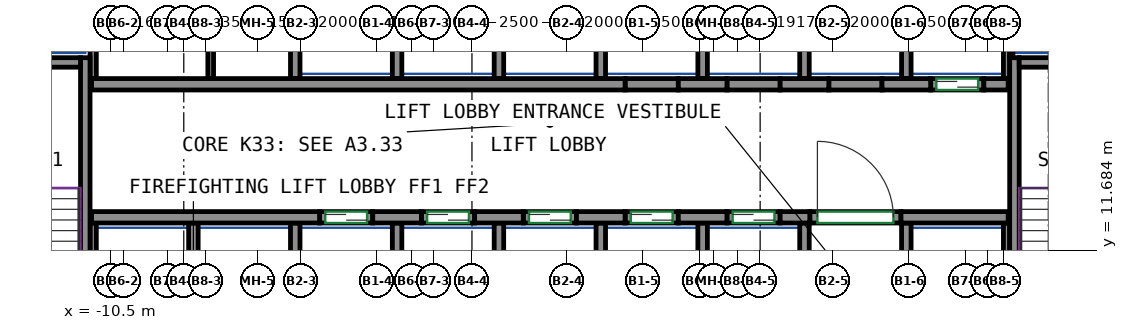
"""IFC4 building model, lengths in metres.
Left out: names, types, materials, properties, quantities, classifications, styles, units other than length and angle.
Written with IfcOpenShell. Run it as: python <this file> out.ifc"""

import sys

from ifc_helpers import new_model, si_unit, direction, frame, frame_2d, origin, place, context, subcontext, project, spatial, rectangle, extrude, source, transform, mapped, element, fill, save


model = new_model("IFC4")
c1 = context("Model", 3, precision=1e-05, world=origin(), true_north=direction((0.0, 1.0)))
c2 = subcontext(c1, "Body", "Model", "MODEL_VIEW")
j1 = project(units=[si_unit("LENGTHUNIT", "METRE"), si_unit("PLANEANGLEUNIT", "RADIAN")], contexts=[c1])
p1 = place(None, origin())
s1 = spatial("IfcSite", under=j1, at=p1, CompositionType="ELEMENT")
p2 = place(p1, origin())
s2 = spatial("IfcBuilding", under=s1, at=p2, CompositionType="ELEMENT")
p3 = place(p2, frame((0.0, 0.0, 143.9)))
s3 = spatial("IfcBuildingStorey", under=s2, at=p3, CompositionType="ELEMENT", Elevation=143.9)
m1 = source(origin(), c2, "Body", "SweptSolid", [
    extrude(rectangle(XDim=7.75, YDim=0.25, at=frame_2d((3.875, 0.0))), origin(), (0.0, 0.0, 1.0), 3.12),
])
p4 = place(p3, frame((-11.175, 9.0, 0.0), z_axis=(0.0, 0.0, 1.0), x_axis=(0.0, 1.0, 0.0)))
e1 = element("IfcWall", 1, at=p4, inside=s3, PredefinedType="SHEAR", context=c2, shape_type="MappedRepresentation", body=[
    mapped(m1, transform((0.0, 0.0, 0.0))),
])
m2 = source(origin(), c2, "Body", "SweptSolid", [
    extrude(rectangle(XDim=3.7, YDim=0.25, at=frame_2d((1.85, 0.0))), origin(), (0.0, 0.0, 1.0), 3.12),
])
p5 = place(p3, frame((-15.0, 16.625, 0.0), z_axis=(0.0, 0.0, 1.0), x_axis=(1.0, 0.0, 0.0)))
e2 = element("IfcWall", 2, at=p5, inside=s3, PredefinedType="SHEAR", context=c2, shape_type="MappedRepresentation", body=[
    mapped(m2, transform((0.0, 0.0, 0.0))),
])
p6 = place(p3, frame((13.275, 9.0, 0.0), z_axis=(0.0, 0.0, 1.0), x_axis=(0.0, 1.0, 0.0)))
e3 = element("IfcWall", 3, at=p6, inside=s3, PredefinedType="SHEAR", context=c2, shape_type="MappedRepresentation", body=[
    mapped(m1, transform((0.0, 0.0, 0.0))),
])
m3 = source(origin(), c2, "Body", "SweptSolid", [
    extrude(rectangle(XDim=3.7, YDim=0.25, at=frame_2d((1.85, 0.0))), origin(), (0.0, 0.0, 1.0), 3.12),
])
p7 = place(p3, frame((13.4, 16.625, 0.0), z_axis=(0.0, 0.0, 1.0), x_axis=(1.0, 0.0, 0.0)))
e4 = element("IfcWall", 4, at=p7, inside=s3, PredefinedType="SHEAR", context=c2, shape_type="MappedRepresentation", body=[
    mapped(m3, transform((0.0, 0.0, 0.0))),
])
m4 = source(origin(), c2, "Body", "SweptSolid", [
    extrude(rectangle(XDim=6.0, YDim=0.3, at=frame_2d((3.0, 0.0))), origin(), (0.0, 0.0, 1.0), 3.12),
])
p8 = place(p3, frame((-11.01, 12.55, 0.0), z_axis=(0.0, 0.0, 1.0), x_axis=(1.0, 0.0, 0.0)))
e5 = element("IfcWall", 5, at=p8, inside=s3, PredefinedType="SHEAR", context=c2, shape_type="MappedRepresentation", body=[
    mapped(m4, transform((0.0, 0.0, 0.0))),
])
m5 = source(origin(), c2, "Body", "SweptSolid", [
    extrude(rectangle(XDim=1.28, YDim=0.3, at=frame_2d((0.64, 0.0))), origin(), (0.0, 0.0, 1.0), 3.12),
])
for number, where, z_axis, x_axis in (
    (6, (-3.61, 12.55, 0.0), (0.0, 0.0, 1.0), (1.0, 0.0, 0.0)),
    (7, (-0.93, 12.55, 0.0), (0.0, 0.0, 1.0), (1.0, 0.0, 0.0)),
    (8, (1.75, 12.55, 0.0), (0.0, 0.0, 1.0), (1.0, 0.0, 0.0)),
    (9, (4.43, 12.55, 0.0), (0.0, 0.0, 1.0), (1.0, 0.0, 0.0)),
):
    element("IfcWall", number, at=place(p3, frame(where, z_axis=z_axis, x_axis=x_axis)), inside=s3, PredefinedType="SHEAR", context=c2, shape_type="MappedRepresentation", body=[
        mapped(m5, transform((0.0, 0.0, 0.0))),
    ])
m6 = source(origin(), c2, "Body", "SweptSolid", [
    extrude(rectangle(XDim=0.78, YDim=0.3, at=frame_2d((0.39, 0.0))), origin(), (0.0, 0.0, 1.0), 3.12),
])
p9 = place(p3, frame((7.11, 12.55, 0.0), z_axis=(0.0, 0.0, 1.0), x_axis=(1.0, 0.0, 0.0)))
e10 = element("IfcWall", 10, at=p9, inside=s3, PredefinedType="SHEAR", context=c2, shape_type="MappedRepresentation", body=[
    mapped(m6, transform((0.0, 0.0, 0.0))),
])
m7 = source(origin(), c2, "Body", "SweptSolid", [
    extrude(rectangle(XDim=2.82, YDim=0.3, at=frame_2d((1.41, 0.0))), origin(), (0.0, 0.0, 1.0), 3.12),
])
p10 = place(p3, frame((10.29, 12.55, 0.0), z_axis=(0.0, 0.0, 1.0), x_axis=(1.0, 0.0, 0.0)))
e11 = element("IfcWall", 11, at=p10, inside=s3, PredefinedType="SHEAR", context=c2, shape_type="MappedRepresentation", body=[
    mapped(m7, transform((0.0, 0.0, 0.0))),
])
m8 = source(origin(), c2, "Body", "SweptSolid", [
    extrude(rectangle(XDim=14.04, YDim=0.3, at=frame_2d((7.02, 0.0))), origin(), (0.0, 0.0, 1.0), 3.12),
])
p11 = place(p3, frame((-11.01, 16.05, 0.0), z_axis=(0.0, 0.0, 1.0), x_axis=(1.0, 0.0, 0.0)))
e12 = element("IfcWall", 12, at=p11, inside=s3, PredefinedType="SHEAR", context=c2, shape_type="MappedRepresentation", body=[
    mapped(m8, transform((0.0, 0.0, 0.0))),
])
p12 = place(p3, frame((4.43, 16.05, 0.0), z_axis=(0.0, 0.0, 1.0), x_axis=(1.0, 0.0, 0.0)))
e13 = element("IfcWall", 13, at=p12, inside=s3, PredefinedType="SHEAR", context=c2, shape_type="MappedRepresentation", body=[
    mapped(m5, transform((0.0, 0.0, 0.0))),
])
m9 = source(origin(), c2, "Body", "SweptSolid", [
    extrude(rectangle(XDim=1.28, YDim=0.3, at=frame_2d((0.64, 0.0))), origin(), (0.0, 0.0, 1.0), 3.12),
])
p13 = place(p3, frame((7.11, 16.05, 0.0), z_axis=(0.0, 0.0, 1.0), x_axis=(1.0, 0.0, 0.0)))
e14 = element("IfcWall", 14, at=p13, inside=s3, PredefinedType="SHEAR", context=c2, shape_type="MappedRepresentation", body=[
    mapped(m9, transform((0.0, 0.0, 0.0))),
])
p14 = place(p3, frame((9.79, 16.05, 0.0), z_axis=(0.0, 0.0, 1.0), x_axis=(1.0, 0.0, 0.0)))
e15 = element("IfcWall", 15, at=p14, inside=s3, PredefinedType="SHEAR", context=c2, shape_type="MappedRepresentation", body=[
    mapped(m5, transform((0.0, 0.0, 0.0))),
])
m10 = source(origin(), c2, "Body", "SweptSolid", [
    extrude(rectangle(XDim=0.64, YDim=0.3, at=frame_2d((0.32, 0.0))), origin(), (0.0, 0.0, 1.0), 3.12),
])
p15 = place(p3, frame((12.47, 16.05, 0.0), z_axis=(0.0, 0.0, 1.0), x_axis=(1.0, 0.0, 0.0)))
e16 = element("IfcWall", 16, at=p15, inside=s3, PredefinedType="SHEAR", context=c2, shape_type="MappedRepresentation", body=[
    mapped(m10, transform((0.0, 0.0, 0.0))),
])
m11 = source(origin(), c2, "Body", "SweptSolid", [
    extrude(rectangle(XDim=1.4, YDim=0.3, at=frame_2d((0.7, 0.0))), origin(), (0.0, 0.0, 1.0), 3.12),
])
p16 = place(p3, frame((-5.01, 12.55, 0.0), z_axis=(0.0, 0.0, 1.0), x_axis=(1.0, 0.0, 0.0)))
e17 = element("IfcWall", 17, at=p16, inside=s3, PredefinedType="PARTITIONING", context=c2, shape_type="MappedRepresentation", body=[
    mapped(m11, transform((0.0, 0.0, 0.0))),
])
p17 = place(p16, frame((0.15, 0.0, 0.0)))
e18 = element("IfcOpeningElement", 18, at=p17, cuts=e17, PredefinedType="OPENING", context=c2, shape_type="SweptSolid", body=[
    extrude(rectangle(XDim=1.1, YDim=2.1, at=frame_2d((0.55, 1.05))), frame((0.0, 0.16, 0.0), z_axis=(0.0, -1.0, 0.0), x_axis=(1.0, 0.0, 0.0)), (0.0, 0.0, 1.0), 0.32),
])
m12 = source(origin(), c2, "Body", "SweptSolid", [
    extrude(rectangle(XDim=1.4, YDim=0.3, at=frame_2d((0.7, 0.0))), origin(), (0.0, 0.0, 1.0), 3.12),
])
p18 = place(p3, frame((-2.33, 12.55, 0.0), z_axis=(0.0, 0.0, 1.0), x_axis=(1.0, 0.0, 0.0)))
e19 = element("IfcWall", 19, at=p18, inside=s3, PredefinedType="PARTITIONING", context=c2, shape_type="MappedRepresentation", body=[
    mapped(m12, transform((0.0, 0.0, 0.0))),
])
p19 = place(p18, frame((0.15, 0.0, 0.0)))
e20 = element("IfcOpeningElement", 20, at=p19, cuts=e19, PredefinedType="OPENING", context=c2, shape_type="SweptSolid", body=[
    extrude(rectangle(XDim=1.1, YDim=2.1, at=frame_2d((0.55, 1.05))), frame((0.0, 0.16, 0.0), z_axis=(0.0, -1.0, 0.0), x_axis=(1.0, 0.0, 0.0)), (0.0, 0.0, 1.0), 0.32),
])
p20 = place(p3, frame((0.35, 12.55, 0.0), z_axis=(0.0, 0.0, 1.0), x_axis=(1.0, 0.0, 0.0)))
e21 = element("IfcWall", 21, at=p20, inside=s3, PredefinedType="PARTITIONING", context=c2, shape_type="MappedRepresentation", body=[
    mapped(m11, transform((0.0, 0.0, 0.0))),
])
p21 = place(p20, frame((0.15, 0.0, 0.0)))
e22 = element("IfcOpeningElement", 22, at=p21, cuts=e21, PredefinedType="OPENING", context=c2, shape_type="SweptSolid", body=[
    extrude(rectangle(XDim=1.1, YDim=2.1, at=frame_2d((0.55, 1.05))), frame((0.0, 0.16, 0.0), z_axis=(0.0, -1.0, 0.0), x_axis=(1.0, 0.0, 0.0)), (0.0, 0.0, 1.0), 0.32),
])
p22 = place(p3, frame((3.03, 12.55, 0.0), z_axis=(0.0, 0.0, 1.0), x_axis=(1.0, 0.0, 0.0)))
e23 = element("IfcWall", 23, at=p22, inside=s3, PredefinedType="PARTITIONING", context=c2, shape_type="MappedRepresentation", body=[
    mapped(m11, transform((0.0, 0.0, 0.0))),
])
p23 = place(p22, frame((0.15, 0.0, 0.0)))
e24 = element("IfcOpeningElement", 24, at=p23, cuts=e23, PredefinedType="OPENING", context=c2, shape_type="SweptSolid", body=[
    extrude(rectangle(XDim=1.1, YDim=2.1, at=frame_2d((0.55, 1.05))), frame((0.0, 0.16, 0.0), z_axis=(0.0, -1.0, 0.0), x_axis=(1.0, 0.0, 0.0)), (0.0, 0.0, 1.0), 0.32),
])
p24 = place(p3, frame((5.71, 12.55, 0.0), z_axis=(0.0, 0.0, 1.0), x_axis=(1.0, 0.0, 0.0)))
e25 = element("IfcWall", 25, at=p24, inside=s3, PredefinedType="PARTITIONING", context=c2, shape_type="MappedRepresentation", body=[
    mapped(m12, transform((0.0, 0.0, 0.0))),
])
p25 = place(p24, frame((0.15, 0.0, 0.0)))
e26 = element("IfcOpeningElement", 26, at=p25, cuts=e25, PredefinedType="OPENING", context=c2, shape_type="SweptSolid", body=[
    extrude(rectangle(XDim=1.1, YDim=2.1, at=frame_2d((0.55, 1.05))), frame((0.0, 0.16, 0.0), z_axis=(0.0, -1.0, 0.0), x_axis=(1.0, 0.0, 0.0)), (0.0, 0.0, 1.0), 0.32),
])
p26 = place(p3, frame((11.07, 16.05, 0.0), z_axis=(0.0, 0.0, 1.0), x_axis=(1.0, 0.0, 0.0)))
e27 = element("IfcWall", 27, at=p26, inside=s3, PredefinedType="PARTITIONING", context=c2, shape_type="MappedRepresentation", body=[
    mapped(m11, transform((0.0, 0.0, 0.0))),
])
p27 = place(p26, frame((0.15, 0.0, 0.0)))
e28 = element("IfcOpeningElement", 28, at=p27, cuts=e27, PredefinedType="OPENING", context=c2, shape_type="SweptSolid", body=[
    extrude(rectangle(XDim=1.1, YDim=2.1, at=frame_2d((0.55, 1.05))), frame((0.0, 0.16, 0.0), z_axis=(0.0, -1.0, 0.0), x_axis=(1.0, 0.0, 0.0)), (0.0, 0.0, 1.0), 0.32),
])
m13 = source(origin(), c2, "Body", "SweptSolid", [
    extrude(rectangle(XDim=2.4, YDim=0.3, at=frame_2d((1.2, 0.0))), origin(), (0.0, 0.0, 1.0), 3.12),
])
p28 = place(p3, frame((7.89, 12.55, 0.0), z_axis=(0.0, 0.0, 1.0), x_axis=(1.0, 0.0, 0.0)))
e29 = element("IfcWall", 29, at=p28, inside=s3, PredefinedType="PARTITIONING", context=c2, shape_type="MappedRepresentation", body=[
    mapped(m13, transform((0.0, 0.0, 0.0))),
])
p29 = place(p28, frame((0.2, 0.0, 0.0)))
e30 = element("IfcOpeningElement", 30, at=p29, cuts=e29, PredefinedType="OPENING", context=c2, shape_type="SweptSolid", body=[
    extrude(rectangle(XDim=2.0, YDim=2.1, at=frame_2d((1.0, 1.05))), frame((0.0, 0.16, 0.0), z_axis=(0.0, -1.0, 0.0), x_axis=(1.0, 0.0, 0.0)), (0.0, 0.0, 1.0), 0.32),
])
p30 = place(p3, frame((3.03, 16.05, 0.0), z_axis=(0.0, 0.0, 1.0), x_axis=(1.0, 0.0, 0.0)))
e31 = element("IfcWall", 31, at=p30, inside=s3, PredefinedType="PARTITIONING", context=c2, shape_type="MappedRepresentation", body=[
    mapped(m11, transform((0.0, 0.0, 0.0))),
])
for number, where, z_axis, x_axis in (
    (32, (5.71, 16.05, 0.0), (0.0, 0.0, 1.0), (1.0, 0.0, 0.0)),
    (33, (8.39, 16.05, 0.0), (0.0, 0.0, 1.0), (1.0, 0.0, 0.0)),
):
    element("IfcWall", number, at=place(p3, frame(where, z_axis=z_axis, x_axis=x_axis)), inside=s3, PredefinedType="PARTITIONING", context=c2, shape_type="MappedRepresentation", body=[
        mapped(m12, transform((0.0, 0.0, 0.0))),
    ])
m14 = source(origin(), c2, "Body", "SweptSolid", [
    extrude(rectangle(XDim=3.275, YDim=0.165, at=frame_2d((1.638, 0.0))), origin(), (0.0, 0.0, 1.0), 3.12),
])
p31 = place(p3, frame((13.067, 16.2, 0.0), z_axis=(0.0, 0.0, 1.0), x_axis=(0.0, 1.0, 0.0)))
e34 = element("IfcWall", 34, at=p31, inside=s3, PredefinedType="PARTITIONING", context=c2, shape_type="MappedRepresentation", body=[
    mapped(m14, transform((0.0, 0.0, 0.0))),
])
m15 = source(origin(), c2, "Body", "SweptSolid", [
    extrude(rectangle(XDim=4.8, YDim=0.165, at=frame_2d((2.4, 0.0))), origin(), (0.0, 0.0, 1.0), 3.12),
])
p32 = place(p3, frame((-10.968, 16.2, 0.0), z_axis=(0.0, 0.0, 1.0), x_axis=(0.0, 1.0, 0.0)))
e35 = element("IfcWall", 35, at=p32, inside=s3, PredefinedType="PARTITIONING", context=c2, shape_type="MappedRepresentation", body=[
    mapped(m15, transform((0.0, 0.0, 0.0))),
])
m16 = source(origin(), c2, "Body", "SweptSolid", [
    extrude(rectangle(XDim=3.275, YDim=0.25, at=frame_2d((1.638, 0.0))), origin(), (0.0, 0.0, 1.0), 3.12),
])
p33 = place(p3, frame((10.43, 16.2, 0.0), z_axis=(0.0, 0.0, 1.0), x_axis=(0.0, 1.0, 0.0)))
e36 = element("IfcWall", 36, at=p33, inside=s3, PredefinedType="PARTITIONING", context=c2, shape_type="MappedRepresentation", body=[
    mapped(m16, transform((0.0, 0.0, 0.0))),
])
m17 = source(origin(), c2, "Body", "SweptSolid", [
    extrude(rectangle(XDim=2.725, YDim=0.085, at=frame_2d((1.363, 0.0))), origin(), (0.0, 0.0, 1.0), 3.12),
])
p34 = place(p3, frame((13.192, 16.75, 0.0), z_axis=(0.0, 0.0, 1.0), x_axis=(0.0, 1.0, 0.0)))
e37 = element("IfcWall", 37, at=p34, inside=s3, PredefinedType="PARTITIONING", context=c2, shape_type="MappedRepresentation", body=[
    mapped(m17, transform((0.0, 0.0, 0.0))),
])
for number, where, z_axis, x_axis in (
    (38, (2.39, 16.2, 0.0), (0.0, 0.0, 1.0), (0.0, 1.0, 0.0)),
    (39, (5.07, 16.2, 0.0), (0.0, 0.0, 1.0), (0.0, 1.0, 0.0)),
    (40, (7.75, 16.2, 0.0), (0.0, 0.0, 1.0), (0.0, 1.0, 0.0)),
    (41, (-0.29, 16.2, 0.0), (0.0, 0.0, 1.0), (0.0, 1.0, 0.0)),
    (42, (-2.97, 16.2, 0.0), (0.0, 0.0, 1.0), (0.0, 1.0, 0.0)),
    (43, (-5.65, 16.2, 0.0), (0.0, 0.0, 1.0), (0.0, 1.0, 0.0)),
):
    element("IfcWall", number, at=place(p3, frame(where, z_axis=z_axis, x_axis=x_axis)), inside=s3, PredefinedType="PARTITIONING", context=c2, shape_type="MappedRepresentation", body=[
        mapped(m16, transform((0.0, 0.0, 0.0))),
    ])
m18 = source(origin(), c2, "Body", "SweptSolid", [
    extrude(rectangle(XDim=3.4, YDim=0.25, at=frame_2d((1.7, 0.0))), origin(), (0.0, 0.0, 1.0), 3.12),
])
p35 = place(p3, frame((10.43, 9.0, 0.0), z_axis=(0.0, 0.0, 1.0), x_axis=(0.0, 1.0, 0.0)))
e44 = element("IfcWall", 44, at=p35, inside=s3, PredefinedType="PARTITIONING", context=c2, shape_type="MappedRepresentation", body=[
    mapped(m18, transform((0.0, 0.0, 0.0))),
])
m19 = source(origin(), c2, "Body", "SweptSolid", [
    extrude(rectangle(XDim=3.4, YDim=0.165, at=frame_2d((1.7, 0.0))), origin(), (0.0, 0.0, 1.0), 3.12),
])
p36 = place(p3, frame((13.067, 9.0, 0.0), z_axis=(0.0, 0.0, 1.0), x_axis=(0.0, 1.0, 0.0)))
e45 = element("IfcWall", 45, at=p36, inside=s3, PredefinedType="PARTITIONING", context=c2, shape_type="MappedRepresentation", body=[
    mapped(m19, transform((0.0, 0.0, 0.0))),
])
for number, where, z_axis, x_axis in (
    (46, (2.39, 9.0, 0.0), (0.0, 0.0, 1.0), (0.0, 1.0, 0.0)),
    (47, (5.07, 9.0, 0.0), (0.0, 0.0, 1.0), (0.0, 1.0, 0.0)),
    (48, (7.75, 9.0, 0.0), (0.0, 0.0, 1.0), (0.0, 1.0, 0.0)),
    (49, (-0.29, 9.0, 0.0), (0.0, 0.0, 1.0), (0.0, 1.0, 0.0)),
):
    element("IfcWall", number, at=place(p3, frame(where, z_axis=z_axis, x_axis=x_axis)), inside=s3, PredefinedType="PARTITIONING", context=c2, shape_type="MappedRepresentation", body=[
        mapped(m18, transform((0.0, 0.0, 0.0))),
    ])
p37 = place(p3, frame((-10.968, 9.0, 0.0), z_axis=(0.0, 0.0, 1.0), x_axis=(0.0, 1.0, 0.0)))
e50 = element("IfcWall", 50, at=p37, inside=s3, PredefinedType="PARTITIONING", context=c2, shape_type="MappedRepresentation", body=[
    mapped(m19, transform((0.0, 0.0, 0.0))),
])
for number, where, z_axis, x_axis in (
    (51, (-2.97, 9.0, 0.0), (0.0, 0.0, 1.0), (0.0, 1.0, 0.0)),
    (52, (-5.65, 9.0, 0.0), (0.0, 0.0, 1.0), (0.0, 1.0, 0.0)),
    (53, (-8.33, 9.0, 0.0), (0.0, 0.0, 1.0), (0.0, 1.0, 0.0)),
):
    element("IfcWall", number, at=place(p3, frame(where, z_axis=z_axis, x_axis=x_axis)), inside=s3, PredefinedType="PARTITIONING", context=c2, shape_type="MappedRepresentation", body=[
        mapped(m18, transform((0.0, 0.0, 0.0))),
    ])
m20 = source(origin(), c2, "Body", "SweptSolid", [
    extrude(rectangle(XDim=4.8, YDim=0.15, at=frame_2d((2.4, 0.0))), origin(), (0.0, 0.0, 1.0), 3.12),
])
p38 = place(p3, frame((-7.875, 16.2, 0.0), z_axis=(0.0, 0.0, 1.0), x_axis=(0.0, 1.0, 0.0)))
e54 = element("IfcWall", 54, at=p38, inside=s3, PredefinedType="PARTITIONING", context=c2, shape_type="MappedRepresentation", body=[
    mapped(m20, transform((0.0, 0.0, 0.0))),
])
p39 = place(p29, origin())
e55 = element("IfcDoor", 55, at=p39, inside=s3, OperationType="DOUBLE_DOOR_SINGLE_SWING", PredefinedType="DOOR", context=c2, shape_type="SweptSolid", body=[
    extrude(rectangle(XDim=2.0, YDim=2.1, at=frame_2d((1.0, 1.05))), frame((0.0, 0.025, 0.0), z_axis=(0.0, -1.0, 0.0), x_axis=(1.0, 0.0, 0.0)), (0.0, 0.0, 1.0), 0.05),
])
fill(e30, e55)
p40 = place(p17, origin())
e56 = element("IfcDoor", 56, at=p40, inside=s3, OperationType="DOUBLE_DOOR_SLIDING", PredefinedType="DOOR", context=c2, shape_type="SweptSolid", body=[
    extrude(rectangle(XDim=1.1, YDim=2.1, at=frame_2d((0.55, 1.05))), frame((0.0, 0.025, 0.0), z_axis=(0.0, -1.0, 0.0), x_axis=(1.0, 0.0, 0.0)), (0.0, 0.0, 1.0), 0.05),
])
fill(e18, e56)
p41 = place(p19, origin())
e57 = element("IfcDoor", 57, at=p41, inside=s3, OperationType="DOUBLE_DOOR_SLIDING", PredefinedType="DOOR", context=c2, shape_type="SweptSolid", body=[
    extrude(rectangle(XDim=1.1, YDim=2.1, at=frame_2d((0.55, 1.05))), frame((0.0, 0.025, 0.0), z_axis=(0.0, -1.0, 0.0), x_axis=(1.0, 0.0, 0.0)), (0.0, 0.0, 1.0), 0.05),
])
fill(e20, e57)
p42 = place(p21, origin())
e58 = element("IfcDoor", 58, at=p42, inside=s3, OperationType="DOUBLE_DOOR_SLIDING", PredefinedType="DOOR", context=c2, shape_type="SweptSolid", body=[
    extrude(rectangle(XDim=1.1, YDim=2.1, at=frame_2d((0.55, 1.05))), frame((0.0, 0.025, 0.0), z_axis=(0.0, -1.0, 0.0), x_axis=(1.0, 0.0, 0.0)), (0.0, 0.0, 1.0), 0.05),
])
fill(e22, e58)
p43 = place(p23, origin())
e59 = element("IfcDoor", 59, at=p43, inside=s3, OperationType="DOUBLE_DOOR_SLIDING", PredefinedType="DOOR", context=c2, shape_type="SweptSolid", body=[
    extrude(rectangle(XDim=1.1, YDim=2.1, at=frame_2d((0.55, 1.05))), frame((0.0, 0.025, 0.0), z_axis=(0.0, -1.0, 0.0), x_axis=(1.0, 0.0, 0.0)), (0.0, 0.0, 1.0), 0.05),
])
fill(e24, e59)
p44 = place(p25, origin())
e60 = element("IfcDoor", 60, at=p44, inside=s3, OperationType="DOUBLE_DOOR_SLIDING", PredefinedType="DOOR", context=c2, shape_type="SweptSolid", body=[
    extrude(rectangle(XDim=1.1, YDim=2.1, at=frame_2d((0.55, 1.05))), frame((0.0, 0.025, 0.0), z_axis=(0.0, -1.0, 0.0), x_axis=(1.0, 0.0, 0.0)), (0.0, 0.0, 1.0), 0.05),
])
fill(e26, e60)
p45 = place(p27, origin())
e61 = element("IfcDoor", 61, at=p45, inside=s3, OperationType="DOUBLE_DOOR_SLIDING", PredefinedType="DOOR", context=c2, shape_type="SweptSolid", body=[
    extrude(rectangle(XDim=1.1, YDim=2.1, at=frame_2d((0.55, 1.05))), frame((0.0, 0.025, 0.0), z_axis=(0.0, -1.0, 0.0), x_axis=(1.0, 0.0, 0.0)), (0.0, 0.0, 1.0), 0.05),
])
fill(e28, e61)
save(model, sys.argv[1])
